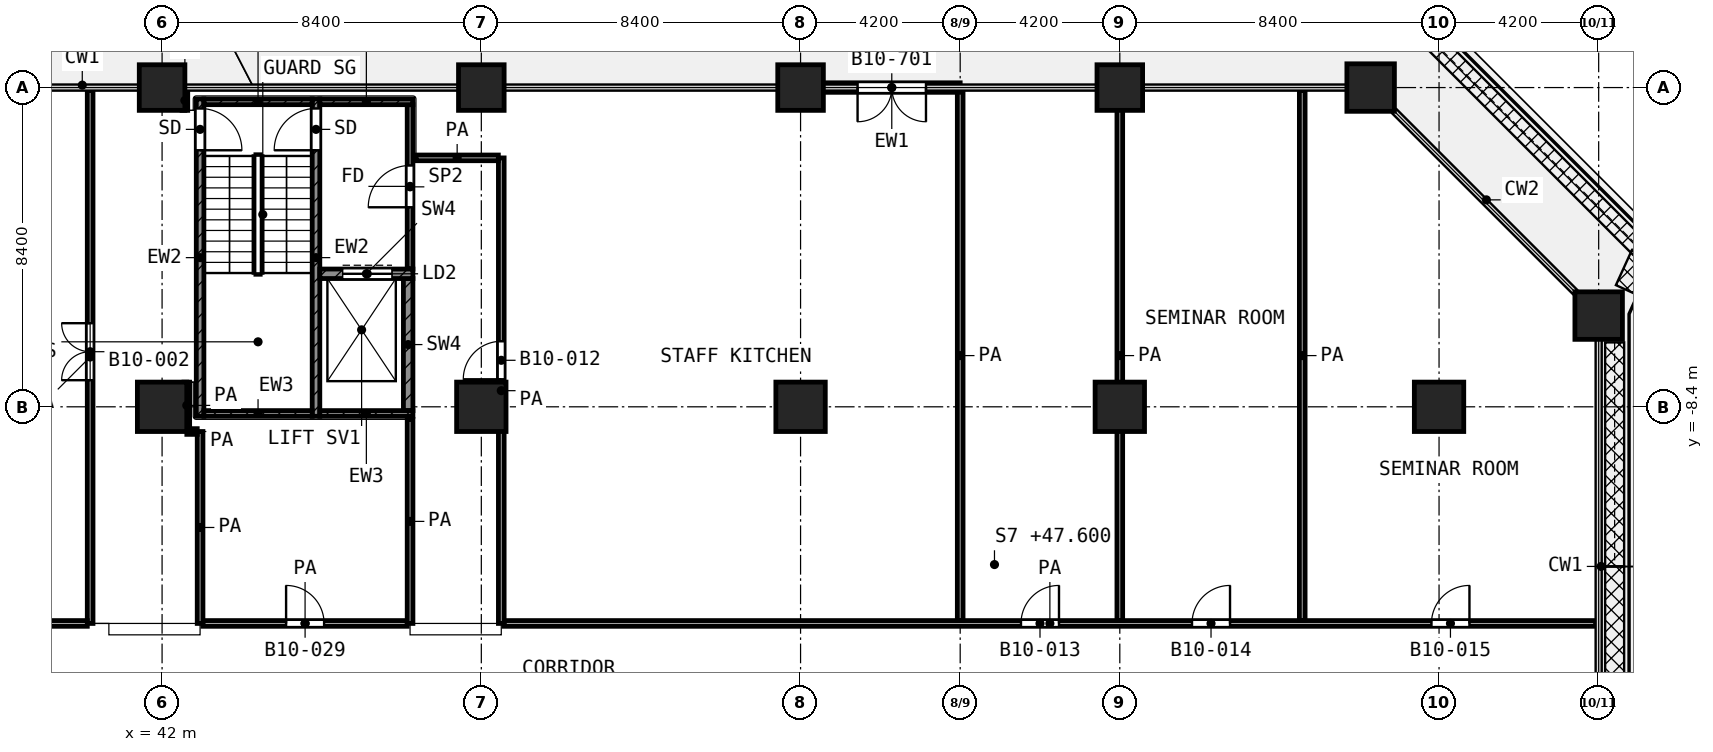
"""IFC4 building model, lengths in metres.
Left out: names, types, materials, properties, quantities, classifications, styles, units other than length and angle.
Written with IfcOpenShell. Run it as: python <this file> out.ifc"""

import sys

from ifc_helpers import new_model, si_unit, direction, frame, frame_2d, origin, origin_2d, place, context, subcontext, project, spatial, rectangle, extrude, element, fill, save


model = new_model("IFC4")
c1 = context("Model", 3, precision=1e-05, world=origin(), true_north=direction((0.0, 1.0)))
c2 = subcontext(c1, "Body", "Model", "MODEL_VIEW")
j1 = project(units=[si_unit("LENGTHUNIT", "METRE"), si_unit("PLANEANGLEUNIT", "RADIAN")], contexts=[c1])
p1 = place(None, origin())
s1 = spatial("IfcSite", under=j1, at=p1, CompositionType="ELEMENT")
p2 = place(p1, origin())
s2 = spatial("IfcBuilding", under=s1, at=p2, CompositionType="ELEMENT")
p3 = place(p2, frame((0.0, 0.0, 47.6)))
s3 = spatial("IfcBuildingStorey", under=s2, at=p3, CompositionType="ELEMENT", Elevation=47.6)
for number, where, z_axis, x_axis in (
    (1, (42.0, 0.0, 0.0), (0.0, 0.0, 1.0), (1.0, 0.0, 0.0)),
    (2, (50.4, 0.0, 0.0), (0.0, 0.0, 1.0), (1.0, 0.0, 0.0)),
    (3, (58.8, 0.0, 0.0), (0.0, 0.0, 1.0), (1.0, 0.0, 0.0)),
    (4, (67.2, 0.0, 0.0), (0.0, 0.0, 1.0), (1.0, 0.0, 0.0)),
):
    element("IfcColumn", number, at=place(p3, frame(where, z_axis=z_axis, x_axis=x_axis)), inside=s3, PredefinedType="COLUMN", context=c2, shape_type="SweptSolid", body=[
        extrude(rectangle(XDim=1.2, YDim=1.2, at=origin_2d()), origin(), (0.0, 0.0, 1.0), 4.2),
    ])
for number, where, z_axis, x_axis in (
    (5, (73.8, 0.0, 0.0), (0.0, 0.0, 1.0), (1.0, 0.0, 0.0)),
    (6, (79.8, -6.0, 0.0), (0.0, 0.0, 1.0), (1.0, 0.0, 0.0)),
):
    element("IfcColumn", number, at=place(p3, frame(where, z_axis=z_axis, x_axis=x_axis)), inside=s3, PredefinedType="COLUMN", context=c2, shape_type="SweptSolid", body=[
        extrude(rectangle(XDim=1.25, YDim=1.25, at=origin_2d()), origin(), (0.0, 0.0, 1.0), 4.2),
    ])
for number, where, z_axis, x_axis in (
    (7, (42.0, -8.4, 0.0), (0.0, 0.0, 1.0), (1.0, 0.0, 0.0)),
    (8, (50.4, -8.4, 0.0), (0.0, 0.0, 1.0), (1.0, 0.0, 0.0)),
    (9, (58.8, -8.4, 0.0), (0.0, 0.0, 1.0), (1.0, 0.0, 0.0)),
    (10, (67.2, -8.4, 0.0), (0.0, 0.0, 1.0), (1.0, 0.0, 0.0)),
    (11, (75.6, -8.4, 0.0), (0.0, 0.0, 1.0), (1.0, 0.0, 0.0)),
):
    element("IfcColumn", number, at=place(p3, frame(where, z_axis=z_axis, x_axis=x_axis)), inside=s3, PredefinedType="COLUMN", context=c2, shape_type="SweptSolid", body=[
        extrude(rectangle(XDim=1.3, YDim=1.3, at=origin_2d()), origin(), (0.0, 0.0, 1.0), 4.2),
    ])
p4 = place(p3, frame((63.0, 0.0, 0.0), z_axis=(0.0, 0.0, 1.0), x_axis=(-1.0, 0.0, 0.0)))
e12 = element("IfcWall", 12, at=p4, inside=s3, PredefinedType="SOLIDWALL", context=c2, shape_type="SweptSolid", body=[
    extrude(rectangle(XDim=3.6, YDim=0.25, at=frame_2d((1.8, 0.0))), origin(), (0.0, 0.0, 1.0), 3.66),
])
p5 = place(p4, frame((0.9, 0.0, 0.0)))
e13 = element("IfcOpeningElement", 13, at=p5, cuts=e12, PredefinedType="OPENING", context=c2, shape_type="SweptSolid", body=[
    extrude(rectangle(XDim=1.8, YDim=2.1, at=frame_2d((0.9, 1.05))), frame((0.0, 0.135, 0.0), z_axis=(0.0, -1.0, 0.0), x_axis=(1.0, 0.0, 0.0)), (0.0, 0.0, 1.0), 0.27),
])
p6 = place(p3, frame((43.0, -8.65, 0.0), z_axis=(0.0, 0.0, 1.0), x_axis=(0.0, 1.0, 0.0)))
e14 = element("IfcWall", 14, at=p6, inside=s3, PredefinedType="SHEAR", context=c2, shape_type="SweptSolid", body=[
    extrude(rectangle(XDim=8.35, YDim=0.2, at=frame_2d((4.175, 0.0))), origin(), (0.0, 0.0, 1.0), 3.78),
])
p7 = place(p6, frame((7.0, 0.0, 0.0)))
e15 = element("IfcOpeningElement", 15, at=p7, cuts=e14, PredefinedType="OPENING", context=c2, shape_type="SweptSolid", body=[
    extrude(rectangle(XDim=1.1, YDim=2.1, at=frame_2d((0.55, 1.05))), frame((0.0, 0.11, 0.0), z_axis=(0.0, -1.0, 0.0), x_axis=(1.0, 0.0, 0.0)), (0.0, 0.0, 1.0), 0.22),
])
p8 = place(p3, frame((46.05, -8.65, 0.0), z_axis=(0.0, 0.0, 1.0), x_axis=(0.0, 1.0, 0.0)))
e16 = element("IfcWall", 16, at=p8, inside=s3, PredefinedType="SHEAR", context=c2, shape_type="SweptSolid", body=[
    extrude(rectangle(XDim=8.35, YDim=0.2, at=frame_2d((4.175, 0.0))), origin(), (0.0, 0.0, 1.0), 3.78),
])
p9 = place(p8, frame((7.0, 0.0, 0.0)))
e17 = element("IfcOpeningElement", 17, at=p9, cuts=e16, PredefinedType="OPENING", context=c2, shape_type="SweptSolid", body=[
    extrude(rectangle(XDim=1.1, YDim=2.1, at=frame_2d((0.55, 1.05))), frame((0.0, 0.11, 0.0), z_axis=(0.0, -1.0, 0.0), x_axis=(1.0, 0.0, 0.0)), (0.0, 0.0, 1.0), 0.22),
])
p10 = place(p3, frame((43.1, -0.375, 0.0), z_axis=(0.0, 0.0, 1.0), x_axis=(1.0, 0.0, 0.0)))
e18 = element("IfcWall", 18, at=p10, inside=s3, PredefinedType="SHEAR", context=c2, shape_type="SweptSolid", body=[
    extrude(rectangle(XDim=2.85, YDim=0.15, at=frame_2d((1.425, 0.0))), origin(), (0.0, 0.0, 1.0), 3.78),
])
p11 = place(p3, frame((46.15, -0.375, 0.0), z_axis=(0.0, 0.0, 1.0), x_axis=(1.0, 0.0, 0.0)))
e19 = element("IfcWall", 19, at=p11, inside=s3, PredefinedType="SHEAR", context=c2, shape_type="SweptSolid", body=[
    extrude(rectangle(XDim=2.45, YDim=0.15, at=frame_2d((1.225, 0.0))), origin(), (0.0, 0.0, 1.0), 3.78),
])
p12 = place(p3, frame((43.1, -8.575, 0.0), z_axis=(0.0, 0.0, 1.0), x_axis=(1.0, 0.0, 0.0)))
e20 = element("IfcWall", 20, at=p12, inside=s3, PredefinedType="SHEAR", context=c2, shape_type="SweptSolid", body=[
    extrude(rectangle(XDim=2.85, YDim=0.15, at=frame_2d((1.425, 0.0))), origin(), (0.0, 0.0, 1.0), 3.78),
])
p13 = place(p3, frame((46.15, -8.575, 0.0), z_axis=(0.0, 0.0, 1.0), x_axis=(1.0, 0.0, 0.0)))
e21 = element("IfcWall", 21, at=p13, inside=s3, PredefinedType="SHEAR", context=c2, shape_type="SweptSolid", body=[
    extrude(rectangle(XDim=2.45, YDim=0.15, at=frame_2d((1.225, 0.0))), origin(), (0.0, 0.0, 1.0), 3.78),
])
p14 = place(p3, frame((46.15, -4.9, 0.0), z_axis=(0.0, 0.0, 1.0), x_axis=(1.0, 0.0, 0.0)))
e22 = element("IfcWall", 22, at=p14, inside=s3, PredefinedType="SHEAR", context=c2, shape_type="SweptSolid", body=[
    extrude(rectangle(XDim=2.45, YDim=0.25, at=frame_2d((1.225, 0.0))), origin(), (0.0, 0.0, 1.0), 3.78),
])
p15 = place(p14, frame((0.6, 0.0, 0.0)))
e23 = element("IfcOpeningElement", 23, at=p15, cuts=e22, PredefinedType="OPENING", context=c2, shape_type="SweptSolid", body=[
    extrude(rectangle(XDim=1.3, YDim=2.1, at=frame_2d((0.65, 1.05))), frame((0.0, 0.135, 0.0), z_axis=(0.0, -1.0, 0.0), x_axis=(1.0, 0.0, 0.0)), (0.0, 0.0, 1.0), 0.27),
])
p16 = place(p3, frame((48.475, -8.5, 0.0), z_axis=(0.0, 0.0, 1.0), x_axis=(0.0, 1.0, 0.0)))
e24 = element("IfcWall", 24, at=p16, inside=s3, PredefinedType="SHEAR", context=c2, shape_type="SweptSolid", body=[
    extrude(rectangle(XDim=3.475, YDim=0.25, at=frame_2d((1.738, 0.0))), origin(), (0.0, 0.0, 1.0), 3.78),
])
p17 = place(p3, frame((48.525, -4.775, 0.0), z_axis=(0.0, 0.0, 1.0), x_axis=(0.0, 1.0, 0.0)))
e25 = element("IfcWall", 25, at=p17, inside=s3, PredefinedType="PARTITIONING", context=c2, shape_type="SweptSolid", body=[
    extrude(rectangle(XDim=4.325, YDim=0.15, at=frame_2d((2.163, 0.0))), origin(), (0.0, 0.0, 1.0), 3.78),
])
p18 = place(p17, frame((1.625, 0.0, 0.0)))
e26 = element("IfcOpeningElement", 26, at=p18, cuts=e25, PredefinedType="OPENING", context=c2, shape_type="SweptSolid", body=[
    extrude(rectangle(XDim=1.1, YDim=2.1, at=frame_2d((0.55, 1.05))), frame((0.0, 0.085, 0.0), z_axis=(0.0, -1.0, 0.0), x_axis=(1.0, 0.0, 0.0)), (0.0, 0.0, 1.0), 0.17),
])
p19 = place(p3, frame((29.475, -14.1, 0.0), z_axis=(0.0, 0.0, 1.0), x_axis=(1.0, 0.0, 0.0)))
e27 = element("IfcWall", 27, at=p19, inside=s3, PredefinedType="PARTITIONING", context=c2, shape_type="SweptSolid", body=[
    extrude(rectangle(XDim=10.557, YDim=0.15, at=frame_2d((5.278, 0.0))), origin(), (0.0, 0.0, 1.0), 3.78),
])
p20 = place(p3, frame((43.075, -14.1, 0.0), z_axis=(0.0, 0.0, 1.0), x_axis=(1.0, 0.0, 0.0)))
e28 = element("IfcWall", 28, at=p20, inside=s3, PredefinedType="PARTITIONING", context=c2, shape_type="SweptSolid", body=[
    extrude(rectangle(XDim=5.375, YDim=0.15, at=frame_2d((2.688, 0.0))), origin(), (0.0, 0.0, 1.0), 3.78),
])
p21 = place(p20, frame((2.188, 0.0, 0.0)))
e29 = element("IfcOpeningElement", 29, at=p21, cuts=e28, PredefinedType="OPENING", context=c2, shape_type="SweptSolid", body=[
    extrude(rectangle(XDim=1.0, YDim=2.1, at=frame_2d((0.5, 1.05))), frame((0.0, 0.085, 0.0), z_axis=(0.0, -1.0, 0.0), x_axis=(1.0, 0.0, 0.0)), (0.0, 0.0, 1.0), 0.17),
])
p22 = place(p3, frame((51.0, -14.1, 0.0), z_axis=(0.0, 0.0, 1.0), x_axis=(1.0, 0.0, 0.0)))
e30 = element("IfcWall", 30, at=p22, inside=s3, PredefinedType="PARTITIONING", context=c2, shape_type="SweptSolid", body=[
    extrude(rectangle(XDim=28.72, YDim=0.15, at=frame_2d((14.36, 0.0))), origin(), (0.0, 0.0, 1.0), 3.78),
])
p23 = place(p22, frame((13.6, 0.0, 0.0)))
e31 = element("IfcOpeningElement", 31, at=p23, cuts=e30, PredefinedType="OPENING", context=c2, shape_type="SweptSolid", body=[
    extrude(rectangle(XDim=1.0, YDim=2.1, at=frame_2d((0.5, 1.05))), frame((0.0, 0.085, 0.0), z_axis=(0.0, -1.0, 0.0), x_axis=(1.0, 0.0, 0.0)), (0.0, 0.0, 1.0), 0.17),
])
p24 = place(p22, frame((18.1, 0.0, 0.0)))
e32 = element("IfcOpeningElement", 32, at=p24, cuts=e30, PredefinedType="OPENING", context=c2, shape_type="SweptSolid", body=[
    extrude(rectangle(XDim=1.0, YDim=2.1, at=frame_2d((0.5, 1.05))), frame((0.0, 0.085, 0.0), z_axis=(0.0, -1.0, 0.0), x_axis=(1.0, 0.0, 0.0)), (0.0, 0.0, 1.0), 0.17),
])
p25 = place(p22, frame((24.4, 0.0, 0.0)))
e33 = element("IfcOpeningElement", 33, at=p25, cuts=e30, PredefinedType="OPENING", context=c2, shape_type="SweptSolid", body=[
    extrude(rectangle(XDim=1.0, YDim=2.1, at=frame_2d((0.5, 1.05))), frame((0.0, 0.085, 0.0), z_axis=(0.0, -1.0, 0.0), x_axis=(1.0, 0.0, 0.0)), (0.0, 0.0, 1.0), 0.17),
])
p26 = place(p3, frame((42.651, -9.05, 0.0), z_axis=(0.0, 0.0, 1.0), x_axis=(1.0, 0.0, 0.0)))
e34 = element("IfcWall", 34, at=p26, inside=s3, PredefinedType="PARTITIONING", context=c2, shape_type="SweptSolid", body=[
    extrude(rectangle(XDim=0.274, YDim=0.15, at=frame_2d((0.137, 0.0))), origin(), (0.0, 0.0, 1.0), 3.78),
])
p27 = place(p3, frame((48.68, -1.85, 0.0), z_axis=(0.0, 0.0, 1.0), x_axis=(1.0, 0.0, 0.0)))
e35 = element("IfcWall", 35, at=p27, inside=s3, PredefinedType="PARTITIONING", context=c2, shape_type="SweptSolid", body=[
    extrude(rectangle(XDim=2.168, YDim=0.15, at=frame_2d((1.084, 0.0))), origin(), (0.0, 0.0, 1.0), 3.78),
])
p28 = place(p3, frame((40.107, -14.1, 0.0), z_axis=(0.0, 0.0, 1.0), x_axis=(0.0, 1.0, 0.0)))
e36 = element("IfcWall", 36, at=p28, inside=s3, PredefinedType="PARTITIONING", context=c2, shape_type="SweptSolid", body=[
    extrude(rectangle(XDim=14.02, YDim=0.15, at=frame_2d((7.01, 0.0))), origin(), (0.0, 0.0, 1.0), 3.78),
])
p29 = place(p28, frame((6.4, 0.0, 0.0)))
e37 = element("IfcOpeningElement", 37, at=p29, cuts=e36, PredefinedType="OPENING", context=c2, shape_type="SweptSolid", body=[
    extrude(rectangle(XDim=1.5, YDim=2.1, at=frame_2d((0.75, 1.05))), frame((0.0, 0.085, 0.0), z_axis=(0.0, -1.0, 0.0), x_axis=(1.0, 0.0, 0.0)), (0.0, 0.0, 1.0), 0.17),
])
p30 = place(p3, frame((42.6, -0.6, 0.0), z_axis=(0.0, 0.0, 1.0), x_axis=(0.0, 1.0, 0.0)))
e38 = element("IfcWall", 38, at=p30, inside=s3, PredefinedType="PARTITIONING", context=c2, shape_type="SweptSolid", body=[
    extrude(rectangle(XDim=0.52, YDim=0.15, at=frame_2d((0.26, 0.0))), origin(), (0.0, 0.0, 1.0), 3.78),
])
p31 = place(p3, frame((42.65, -8.975, 0.0), z_axis=(0.0, 0.0, 1.0), x_axis=(0.0, 1.0, 0.0)))
e39 = element("IfcWall", 39, at=p31, inside=s3, PredefinedType="PARTITIONING", context=c2, shape_type="SweptSolid", body=[
    extrude(rectangle(XDim=1.224, YDim=0.15, at=frame_2d((0.612, 0.0))), origin(), (0.0, 0.0, 1.0), 3.78),
])
p32 = place(p3, frame((43.0, -14.1, 0.0), z_axis=(0.0, 0.0, 1.0), x_axis=(0.0, 1.0, 0.0)))
e40 = element("IfcWall", 40, at=p32, inside=s3, PredefinedType="PARTITIONING", context=c2, shape_type="SweptSolid", body=[
    extrude(rectangle(XDim=5.05, YDim=0.15, at=frame_2d((2.525, 0.0))), origin(), (0.0, 0.0, 1.0), 3.78),
])
p33 = place(p3, frame((48.525, -14.1, 0.0), z_axis=(0.0, 0.0, 1.0), x_axis=(0.0, 1.0, 0.0)))
e41 = element("IfcWall", 41, at=p33, inside=s3, PredefinedType="PARTITIONING", context=c2, shape_type="SweptSolid", body=[
    extrude(rectangle(XDim=5.37, YDim=0.15, at=frame_2d((2.685, 0.0))), origin(), (0.0, 0.0, 1.0), 3.78),
])
p34 = place(p3, frame((50.925, -14.1, 0.0), z_axis=(0.0, 0.0, 1.0), x_axis=(0.0, 1.0, 0.0)))
e42 = element("IfcWall", 42, at=p34, inside=s3, PredefinedType="PARTITIONING", context=c2, shape_type="SweptSolid", body=[
    extrude(rectangle(XDim=12.249, YDim=0.15, at=frame_2d((6.125, 0.0))), origin(), (0.0, 0.0, 1.0), 3.78),
])
p35 = place(p34, frame((6.424, 0.0, 0.0)))
e43 = element("IfcOpeningElement", 43, at=p35, cuts=e42, PredefinedType="OPENING", context=c2, shape_type="SweptSolid", body=[
    extrude(rectangle(XDim=1.0, YDim=2.1, at=frame_2d((0.5, 1.05))), frame((0.0, 0.085, 0.0), z_axis=(0.0, -1.0, 0.0), x_axis=(1.0, 0.0, 0.0)), (0.0, 0.0, 1.0), 0.17),
])
for number, where, z_axis, x_axis in (
    (44, (63.0, -14.025, 0.0), (0.0, 0.0, 1.0), (0.0, 1.0, 0.0)),
    (45, (67.2, -14.025, 0.0), (0.0, 0.0, 1.0), (0.0, 1.0, 0.0)),
    (46, (72.0, -14.025, 0.0), (0.0, 0.0, 1.0), (0.0, 1.0, 0.0)),
):
    element("IfcWall", number, at=place(p3, frame(where, z_axis=z_axis, x_axis=x_axis)), inside=s3, PredefinedType="PARTITIONING", context=c2, shape_type="SweptSolid", body=[
        extrude(rectangle(XDim=13.945, YDim=0.15, at=frame_2d((6.972, 0.0))), origin(), (0.0, 0.0, 1.0), 3.78),
    ])
p36 = place(p5, origin())
e47 = element("IfcDoor", 47, at=p36, inside=s3, OperationType="DOUBLE_DOOR_SINGLE_SWING", PredefinedType="DOOR", context=c2, shape_type="SweptSolid", body=[
    extrude(rectangle(XDim=1.8, YDim=2.1, at=frame_2d((0.9, 1.05))), frame((0.0, 0.025, 0.0), z_axis=(0.0, -1.0, 0.0), x_axis=(1.0, 0.0, 0.0)), (0.0, 0.0, 1.0), 0.05),
])
fill(e13, e47)
p37 = place(p7, frame((1.1, 0.0, 0.0), z_axis=(0.0, 0.0, 1.0), x_axis=(-1.0, 0.0, 0.0)))
e48 = element("IfcDoor", 48, at=p37, inside=s3, OperationType="SINGLE_SWING_LEFT", PredefinedType="DOOR", context=c2, shape_type="SweptSolid", body=[
    extrude(rectangle(XDim=1.1, YDim=2.1, at=frame_2d((0.55, 1.05))), frame((0.0, 0.025, 0.0), z_axis=(0.0, -1.0, 0.0), x_axis=(1.0, 0.0, 0.0)), (0.0, 0.0, 1.0), 0.05),
])
fill(e15, e48)
p38 = place(p9, origin())
e49 = element("IfcDoor", 49, at=p38, inside=s3, OperationType="SINGLE_SWING_LEFT", PredefinedType="DOOR", context=c2, shape_type="SweptSolid", body=[
    extrude(rectangle(XDim=1.1, YDim=2.1, at=frame_2d((0.55, 1.05))), frame((0.0, 0.025, 0.0), z_axis=(0.0, -1.0, 0.0), x_axis=(1.0, 0.0, 0.0)), (0.0, 0.0, 1.0), 0.05),
])
fill(e17, e49)
p39 = place(p15, origin())
e50 = element("IfcDoor", 50, at=p39, inside=s3, OperationType="DOUBLE_DOOR_SLIDING", PredefinedType="DOOR", context=c2, shape_type="SweptSolid", body=[
    extrude(rectangle(XDim=1.3, YDim=2.1, at=frame_2d((0.65, 1.05))), frame((0.0, 0.025, 0.0), z_axis=(0.0, -1.0, 0.0), x_axis=(1.0, 0.0, 0.0)), (0.0, 0.0, 1.0), 0.05),
])
fill(e23, e50)
p40 = place(p18, origin())
e51 = element("IfcDoor", 51, at=p40, inside=s3, OperationType="SINGLE_SWING_LEFT", PredefinedType="DOOR", context=c2, shape_type="SweptSolid", body=[
    extrude(rectangle(XDim=1.1, YDim=2.1, at=frame_2d((0.55, 1.05))), frame((0.0, 0.025, 0.0), z_axis=(0.0, -1.0, 0.0), x_axis=(1.0, 0.0, 0.0)), (0.0, 0.0, 1.0), 0.05),
])
fill(e26, e51)
p41 = place(p35, origin())
e52 = element("IfcDoor", 52, at=p41, inside=s3, OperationType="SINGLE_SWING_LEFT", PredefinedType="DOOR", context=c2, shape_type="SweptSolid", body=[
    extrude(rectangle(XDim=1.0, YDim=2.1, at=frame_2d((0.5, 1.05))), frame((0.0, 0.025, 0.0), z_axis=(0.0, -1.0, 0.0), x_axis=(1.0, 0.0, 0.0)), (0.0, 0.0, 1.0), 0.05),
])
fill(e43, e52)
p42 = place(p23, origin())
e53 = element("IfcDoor", 53, at=p42, inside=s3, OperationType="SINGLE_SWING_RIGHT", PredefinedType="DOOR", context=c2, shape_type="SweptSolid", body=[
    extrude(rectangle(XDim=1.0, YDim=2.1, at=frame_2d((0.5, 1.05))), frame((0.0, 0.025, 0.0), z_axis=(0.0, -1.0, 0.0), x_axis=(1.0, 0.0, 0.0)), (0.0, 0.0, 1.0), 0.05),
])
fill(e31, e53)
p43 = place(p24, origin())
e54 = element("IfcDoor", 54, at=p43, inside=s3, OperationType="SINGLE_SWING_RIGHT", PredefinedType="DOOR", context=c2, shape_type="SweptSolid", body=[
    extrude(rectangle(XDim=1.0, YDim=2.1, at=frame_2d((0.5, 1.05))), frame((0.0, 0.025, 0.0), z_axis=(0.0, -1.0, 0.0), x_axis=(1.0, 0.0, 0.0)), (0.0, 0.0, 1.0), 0.05),
])
fill(e32, e54)
p44 = place(p25, origin())
e55 = element("IfcDoor", 55, at=p44, inside=s3, OperationType="SINGLE_SWING_RIGHT", PredefinedType="DOOR", context=c2, shape_type="SweptSolid", body=[
    extrude(rectangle(XDim=1.0, YDim=2.1, at=frame_2d((0.5, 1.05))), frame((0.0, 0.025, 0.0), z_axis=(0.0, -1.0, 0.0), x_axis=(1.0, 0.0, 0.0)), (0.0, 0.0, 1.0), 0.05),
])
fill(e33, e55)
p45 = place(p29, origin())
e56 = element("IfcDoor", 56, at=p45, inside=s3, OperationType="DOUBLE_DOOR_SINGLE_SWING", PredefinedType="DOOR", context=c2, shape_type="SweptSolid", body=[
    extrude(rectangle(XDim=1.5, YDim=2.1, at=frame_2d((0.75, 1.05))), frame((0.0, 0.025, 0.0), z_axis=(0.0, -1.0, 0.0), x_axis=(1.0, 0.0, 0.0)), (0.0, 0.0, 1.0), 0.05),
])
fill(e37, e56)
p46 = place(p21, origin())
e57 = element("IfcDoor", 57, at=p46, inside=s3, OperationType="SINGLE_SWING_LEFT", PredefinedType="DOOR", context=c2, shape_type="SweptSolid", body=[
    extrude(rectangle(XDim=1.0, YDim=2.1, at=frame_2d((0.5, 1.05))), frame((0.0, 0.025, 0.0), z_axis=(0.0, -1.0, 0.0), x_axis=(1.0, 0.0, 0.0)), (0.0, 0.0, 1.0), 0.05),
])
fill(e29, e57)
save(model, sys.argv[1])
